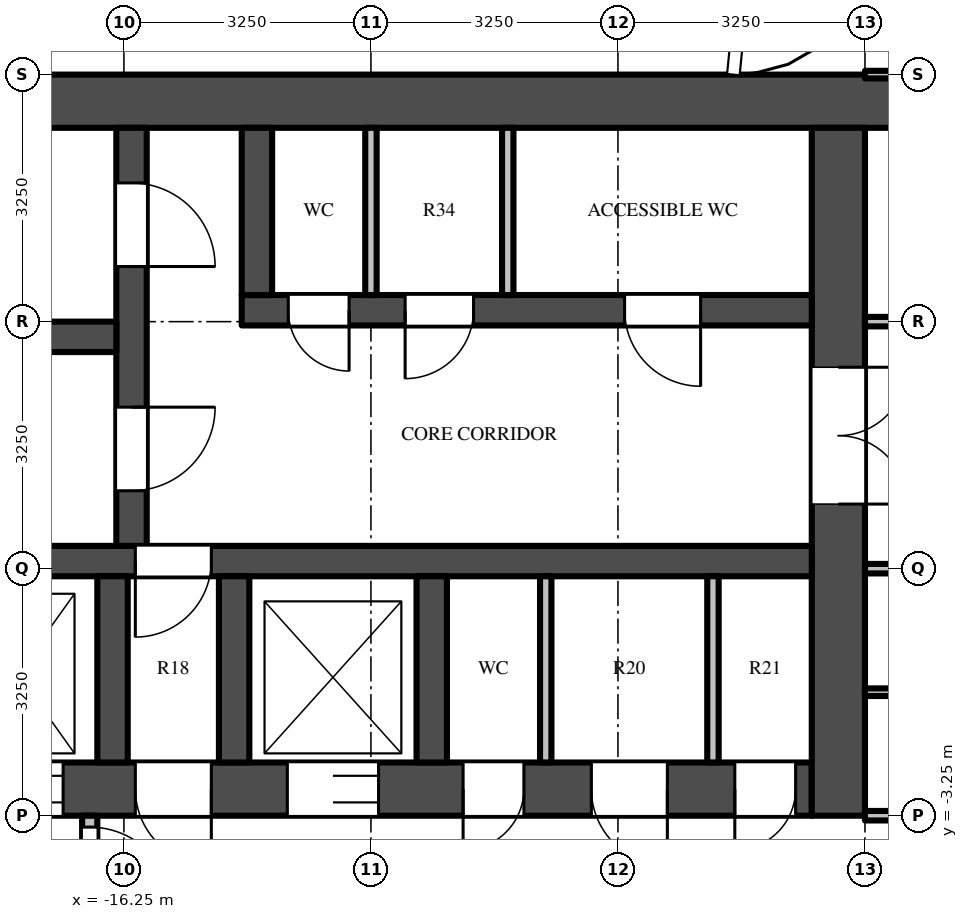
"""IFC4 building model, lengths in metres.
Left out: names, types, materials, properties, quantities, classifications, styles, units other than length and angle.
Written with IfcOpenShell. Run it as: python <this file> out.ifc"""

import sys

from ifc_helpers import new_model, si_unit, direction, frame, frame_2d, origin, place, context, subcontext, project, spatial, rectangle, extrude, source, transform, mapped, element, fill, save


model = new_model("IFC4")
c1 = context("Model", 3, precision=1e-05, world=origin(), true_north=direction((0.0, 1.0)))
c2 = subcontext(c1, "Body", "Model", "MODEL_VIEW")
j1 = project(units=[si_unit("LENGTHUNIT", "METRE"), si_unit("PLANEANGLEUNIT", "RADIAN")], contexts=[c1])
p1 = place(None, origin())
s1 = spatial("IfcSite", under=j1, at=p1, CompositionType="ELEMENT")
p2 = place(p1, origin())
s2 = spatial("IfcBuilding", under=s1, at=p2, CompositionType="ELEMENT")
p3 = place(p2, frame((0.0, 0.0, 295.0)))
s3 = spatial("IfcBuildingStorey", under=s2, at=p3, CompositionType="ELEMENT", Elevation=295.0)
m1 = source(origin(), c2, "Body", "SweptSolid", [
    extrude(rectangle(XDim=16.65, YDim=0.7, at=frame_2d((8.325, 0.0))), origin(), (0.0, 0.0, 1.0), 3.7),
])
p4 = place(p3, frame((-6.1, 6.15, 0.0), z_axis=(0.0, 0.0, 1.0), x_axis=(-1.0, 0.0, 0.0)))
e1 = element("IfcWall", 1, at=p4, inside=s3, PredefinedType="SHEAR", context=c2, shape_type="MappedRepresentation", body=[
    mapped(m1, transform((0.0, 0.0, 0.0))),
])
m2 = source(origin(), c2, "Body", "SweptSolid", [
    extrude(rectangle(XDim=14.85, YDim=0.7, at=frame_2d((7.425, 0.0))), origin(), (0.0, 0.0, 1.0), 3.7),
])
p5 = place(p3, frame((-7.2, -2.9, 0.0), z_axis=(0.0, 0.0, 1.0), x_axis=(-1.0, 0.0, 0.0)))
e2 = element("IfcWall", 2, at=p5, inside=s3, PredefinedType="SHEAR", context=c2, shape_type="MappedRepresentation", body=[
    mapped(m2, transform((0.0, 0.0, 0.0))),
])
m3 = source(origin(), c2, "Body", "SweptSolid", [
    extrude(rectangle(XDim=1.2, YDim=2.1, at=frame_2d((0.6, 1.05))), frame((0.0, 0.36, 0.0), z_axis=(0.0, -1.0, 0.0), x_axis=(1.0, 0.0, 0.0)), (0.0, 0.0, 1.0), 0.72),
])
p6 = place(p5, frame((5.7, 0.0, 0.0)))
e3 = element("IfcOpeningElement", 3, at=p6, cuts=e2, PredefinedType="OPENING", context=c2, shape_type="MappedRepresentation", body=[
    mapped(m3, transform((0.0, 0.0, 0.0))),
])
m4 = source(origin(), c2, "Body", "SweptSolid", [
    extrude(rectangle(XDim=1.3, YDim=2.1, at=frame_2d((0.65, 1.05))), frame((0.0, 0.36, 0.0), z_axis=(0.0, -1.0, 0.0), x_axis=(1.0, 0.0, 0.0)), (0.0, 0.0, 1.0), 0.72),
])
p7 = place(p5, frame((12.2, 0.0, 0.0)))
e4 = element("IfcOpeningElement", 4, at=p7, cuts=e2, PredefinedType="OPENING", context=c2, shape_type="MappedRepresentation", body=[
    mapped(m4, transform((0.0, 0.0, 0.0))),
])
p8 = place(p5, frame((9.85, 0.0, 0.0)))
e5 = element("IfcOpeningElement", 5, at=p8, cuts=e2, PredefinedType="OPENING", context=c2, shape_type="MappedRepresentation", body=[
    mapped(m3, transform((0.0, 0.0, 0.0))),
])
m5 = source(origin(), c2, "Body", "SweptSolid", [
    extrude(rectangle(XDim=1.0, YDim=2.1, at=frame_2d((0.5, 1.05))), frame((0.0, 0.36, 0.0), z_axis=(0.0, -1.0, 0.0), x_axis=(1.0, 0.0, 0.0)), (0.0, 0.0, 1.0), 0.72),
])
p9 = place(p5, frame((7.9, 0.0, 0.0)))
e6 = element("IfcOpeningElement", 6, at=p9, cuts=e2, PredefinedType="OPENING", context=c2, shape_type="MappedRepresentation", body=[
    mapped(m5, transform((0.0, 0.0, 0.0))),
])
m6 = source(origin(), c2, "Body", "SweptSolid", [
    extrude(rectangle(XDim=0.8, YDim=2.1, at=frame_2d((0.4, 1.05))), frame((0.0, 0.36, 0.0), z_axis=(0.0, -1.0, 0.0), x_axis=(1.0, 0.0, 0.0)), (0.0, 0.0, 1.0), 0.72),
])
p10 = place(p5, frame((0.212, 0.0, 0.0)))
e7 = element("IfcOpeningElement", 7, at=p10, cuts=e2, PredefinedType="OPENING", context=c2, shape_type="MappedRepresentation", body=[
    mapped(m6, transform((0.0, 0.0, 0.0))),
])
p11 = place(p5, frame((1.9, 0.0, 0.0)))
e8 = element("IfcOpeningElement", 8, at=p11, cuts=e2, PredefinedType="OPENING", context=c2, shape_type="MappedRepresentation", body=[
    mapped(m5, transform((0.0, 0.0, 0.0))),
])
p12 = place(p5, frame((3.788, 0.0, 0.0)))
e9 = element("IfcOpeningElement", 9, at=p12, cuts=e2, PredefinedType="OPENING", context=c2, shape_type="MappedRepresentation", body=[
    mapped(m6, transform((0.0, 0.0, 0.0))),
])
m7 = source(origin(), c2, "Body", "SweptSolid", [
    extrude(rectangle(XDim=9.05, YDim=0.7, at=frame_2d((4.525, 0.0))), origin(), (0.0, 0.0, 1.0), 3.7),
])
p13 = place(p3, frame((-6.85, 5.8, 0.0), z_axis=(0.0, 0.0, 1.0), x_axis=(0.0, -1.0, 0.0)))
e10 = element("IfcWall", 10, at=p13, inside=s3, PredefinedType="SHEAR", context=c2, shape_type="MappedRepresentation", body=[
    mapped(m7, transform((0.0, 0.0, 0.0))),
])
m8 = source(origin(), c2, "Body", "SweptSolid", [
    extrude(rectangle(XDim=1.8, YDim=2.1, at=frame_2d((0.9, 1.05))), frame((0.0, 0.36, 0.0), z_axis=(0.0, -1.0, 0.0), x_axis=(1.0, 0.0, 0.0)), (0.0, 0.0, 1.0), 0.72),
])
p14 = place(p13, frame((3.15, 0.0, 0.0)))
e11 = element("IfcOpeningElement", 11, at=p14, cuts=e10, PredefinedType="OPENING", context=c2, shape_type="MappedRepresentation", body=[
    mapped(m8, transform((0.0, 0.0, 0.0))),
])
m9 = source(origin(), c2, "Body", "SweptSolid", [
    extrude(rectangle(XDim=7.5, YDim=0.4, at=frame_2d((3.75, 0.0))), origin(), (0.0, 0.0, 1.0), 3.7),
])
p15 = place(p3, frame((-7.2, 3.4, 0.0), z_axis=(0.0, 0.0, 1.0), x_axis=(-1.0, 0.0, 0.0)))
e12 = element("IfcWall", 12, at=p15, inside=s3, PredefinedType="SHEAR", context=c2, shape_type="MappedRepresentation", body=[
    mapped(m9, transform((0.0, 0.0, 0.0))),
])
m10 = source(origin(), c2, "Body", "SweptSolid", [
    extrude(rectangle(XDim=1.0, YDim=2.1, at=frame_2d((0.5, 1.05))), frame((0.0, 0.21, 0.0), z_axis=(0.0, -1.0, 0.0), x_axis=(1.0, 0.0, 0.0)), (0.0, 0.0, 1.0), 0.42),
])
p16 = place(p15, frame((1.462, 0.0, 0.0)))
e13 = element("IfcOpeningElement", 13, at=p16, cuts=e12, PredefinedType="OPENING", context=c2, shape_type="MappedRepresentation", body=[
    mapped(m10, transform((0.0, 0.0, 0.0))),
])
m11 = source(origin(), c2, "Body", "SweptSolid", [
    extrude(rectangle(XDim=0.9, YDim=2.1, at=frame_2d((0.45, 1.05))), frame((0.0, 0.21, 0.0), z_axis=(0.0, -1.0, 0.0), x_axis=(1.0, 0.0, 0.0)), (0.0, 0.0, 1.0), 0.42),
])
p17 = place(p15, frame((4.45, 0.0, 0.0)))
e14 = element("IfcOpeningElement", 14, at=p17, cuts=e12, PredefinedType="OPENING", context=c2, shape_type="MappedRepresentation", body=[
    mapped(m11, transform((0.0, 0.0, 0.0))),
])
m12 = source(origin(), c2, "Body", "SweptSolid", [
    extrude(rectangle(XDim=0.8, YDim=2.1, at=frame_2d((0.4, 1.05))), frame((0.0, 0.21, 0.0), z_axis=(0.0, -1.0, 0.0), x_axis=(1.0, 0.0, 0.0)), (0.0, 0.0, 1.0), 0.42),
])
p18 = place(p15, frame((6.087, 0.0, 0.0)))
e15 = element("IfcOpeningElement", 15, at=p18, cuts=e12, PredefinedType="OPENING", context=c2, shape_type="MappedRepresentation", body=[
    mapped(m12, transform((0.0, 0.0, 0.0))),
])
m13 = source(origin(), c2, "Body", "SweptSolid", [
    extrude(rectangle(XDim=14.85, YDim=0.4, at=frame_2d((7.425, 0.0))), origin(), (0.0, 0.0, 1.0), 3.7),
])
p19 = place(p3, frame((-7.2, 0.1, 0.0), z_axis=(0.0, 0.0, 1.0), x_axis=(-1.0, 0.0, 0.0)))
e16 = element("IfcWall", 16, at=p19, inside=s3, PredefinedType="SHEAR", context=c2, shape_type="MappedRepresentation", body=[
    mapped(m13, transform((0.0, 0.0, 0.0))),
])
p20 = place(p19, frame((7.9, 0.0, 0.0)))
e17 = element("IfcOpeningElement", 17, at=p20, cuts=e16, PredefinedType="OPENING", context=c2, shape_type="MappedRepresentation", body=[
    mapped(m10, transform((0.0, 0.0, 0.0))),
])
m14 = source(origin(), c2, "Body", "SweptSolid", [
    extrude(rectangle(XDim=5.5, YDim=0.4, at=frame_2d((2.75, 0.0))), origin(), (0.0, 0.0, 1.0), 3.7),
])
p21 = place(p3, frame((-16.15, 5.8, 0.0), z_axis=(0.0, 0.0, 1.0), x_axis=(0.0, -1.0, 0.0)))
e18 = element("IfcWall", 18, at=p21, inside=s3, PredefinedType="SHEAR", context=c2, shape_type="MappedRepresentation", body=[
    mapped(m14, transform((0.0, 0.0, 0.0))),
])
m15 = source(origin(), c2, "Body", "SweptSolid", [
    extrude(rectangle(XDim=1.1, YDim=2.1, at=frame_2d((0.55, 1.05))), frame((0.0, 0.21, 0.0), z_axis=(0.0, -1.0, 0.0), x_axis=(1.0, 0.0, 0.0)), (0.0, 0.0, 1.0), 0.42),
])
p22 = place(p21, frame((0.725, 0.0, 0.0)))
e19 = element("IfcOpeningElement", 19, at=p22, cuts=e18, PredefinedType="OPENING", context=c2, shape_type="MappedRepresentation", body=[
    mapped(m15, transform((0.0, 0.0, 0.0))),
])
p23 = place(p21, frame((3.675, 0.0, 0.0)))
e20 = element("IfcOpeningElement", 20, at=p23, cuts=e18, PredefinedType="OPENING", context=c2, shape_type="MappedRepresentation", body=[
    mapped(m15, transform((0.0, 0.0, 0.0))),
])
m16 = source(origin(), c2, "Body", "SweptSolid", [
    extrude(rectangle(XDim=5.7, YDim=0.4, at=frame_2d((2.85, 0.0))), origin(), (0.0, 0.0, 1.0), 3.7),
])
p24 = place(p3, frame((-16.35, 3.05, 0.0), z_axis=(0.0, 0.0, 1.0), x_axis=(-1.0, 0.0, 0.0)))
e21 = element("IfcWall", 21, at=p24, inside=s3, PredefinedType="SHEAR", context=c2, shape_type="MappedRepresentation", body=[
    mapped(m16, transform((0.0, 0.0, 0.0))),
])
m17 = source(origin(), c2, "Body", "SweptSolid", [
    extrude(rectangle(XDim=2.2, YDim=0.4, at=frame_2d((1.1, 0.0))), origin(), (0.0, 0.0, 1.0), 3.7),
])
p25 = place(p3, frame((-14.5, 5.8, 0.0), z_axis=(0.0, 0.0, 1.0), x_axis=(0.0, -1.0, 0.0)))
e22 = element("IfcWall", 22, at=p25, inside=s3, PredefinedType="SHEAR", context=c2, shape_type="MappedRepresentation", body=[
    mapped(m17, transform((0.0, 0.0, 0.0))),
])
m18 = source(origin(), c2, "Body", "SweptSolid", [
    extrude(rectangle(XDim=2.45, YDim=0.4, at=frame_2d((1.225, 0.0))), origin(), (0.0, 0.0, 1.0), 3.7),
])
for number, where, z_axis, x_axis in (
    (23, (-12.2, -0.1, 0.0), (0.0, 0.0, 1.0), (0.0, -1.0, 0.0)),
    (24, (-14.8, -0.1, 0.0), (0.0, 0.0, 1.0), (0.0, -1.0, 0.0)),
    (25, (-16.4, -0.1, 0.0), (0.0, 0.0, 1.0), (0.0, -1.0, 0.0)),
):
    element("IfcWall", number, at=place(p3, frame(where, z_axis=z_axis, x_axis=x_axis)), inside=s3, PredefinedType="SHEAR", context=c2, shape_type="MappedRepresentation", body=[
        mapped(m18, transform((0.0, 0.0, 0.0))),
    ])
m19 = source(origin(), c2, "Body", "SweptSolid", [
    extrude(rectangle(XDim=3.25, YDim=0.2, at=frame_2d((1.625, 0.0))), origin(), (0.0, 0.0, 1.0), 3.7),
])
p26 = place(p3, frame((-16.7, -3.25, 0.0), z_axis=(0.0, 0.0, 1.0), x_axis=(0.0, -1.0, 0.0)))
e26 = element("IfcWall", 26, at=p26, inside=s3, PredefinedType="PARTITIONING", context=c2, shape_type="MappedRepresentation", body=[
    mapped(m19, transform((0.0, 0.0, 0.0))),
])
m20 = source(origin(), c2, "Body", "SweptSolid", [
    extrude(rectangle(XDim=1.1, YDim=2.1, at=frame_2d((0.55, 1.05))), frame((0.0, 0.11, 0.0), z_axis=(0.0, -1.0, 0.0), x_axis=(1.0, 0.0, 0.0)), (0.0, 0.0, 1.0), 0.22),
])
p27 = place(p26, frame((0.15, 0.0, 0.0)))
e27 = element("IfcOpeningElement", 27, at=p27, cuts=e26, PredefinedType="OPENING", context=c2, shape_type="MappedRepresentation", body=[
    mapped(m20, transform((0.0, 0.0, 0.0))),
])
m21 = source(origin(), c2, "Body", "SweptSolid", [
    extrude(rectangle(XDim=2.2, YDim=0.15, at=frame_2d((1.1, 0.0))), origin(), (0.0, 0.0, 1.0), 3.7),
])
for number, where, z_axis, x_axis in (
    (28, (-11.2, 5.8, 0.0), (0.0, 0.0, 1.0), (0.0, -1.0, 0.0)),
    (29, (-13.0, 5.8, 0.0), (0.0, 0.0, 1.0), (0.0, -1.0, 0.0)),
):
    element("IfcWall", number, at=place(p3, frame(where, z_axis=z_axis, x_axis=x_axis)), inside=s3, PredefinedType="PARTITIONING", context=c2, shape_type="MappedRepresentation", body=[
        mapped(m21, transform((0.0, 0.0, 0.0))),
    ])
m22 = source(origin(), c2, "Body", "SweptSolid", [
    extrude(rectangle(XDim=2.45, YDim=0.15, at=frame_2d((1.225, 0.0))), origin(), (0.0, 0.0, 1.0), 3.7),
])
for number, where, z_axis, x_axis in (
    (30, (-8.5, -0.1, 0.0), (0.0, 0.0, 1.0), (0.0, -1.0, 0.0)),
    (31, (-10.7, -0.1, 0.0), (0.0, 0.0, 1.0), (0.0, -1.0, 0.0)),
):
    element("IfcWall", number, at=place(p3, frame(where, z_axis=z_axis, x_axis=x_axis)), inside=s3, PredefinedType="PARTITIONING", context=c2, shape_type="MappedRepresentation", body=[
        mapped(m22, transform((0.0, 0.0, 0.0))),
    ])
m23 = source(origin(), c2, "Body", "SweptSolid", [
    extrude(rectangle(XDim=5.363, YDim=0.125, at=frame_2d((2.681, 0.0))), origin(), (0.0, 0.0, 1.0), 2.997),
])
p28 = place(p3, frame((-1.137, -3.25, 0.0), z_axis=(0.0, 0.0, 1.0), x_axis=(-1.0, 0.0, 0.0)))
e32 = element("IfcWall", 32, at=p28, inside=s3, PredefinedType="PARTITIONING", context=c2, shape_type="MappedRepresentation", body=[
    mapped(m23, transform((0.0, 0.0, 0.0))),
])
m24 = source(origin(), c2, "Body", "SweptSolid", [
    extrude(rectangle(XDim=1.0, YDim=2.1, at=frame_2d((0.5, 1.05))), frame((0.0, 0.073, 0.0), z_axis=(0.0, -1.0, 0.0), x_axis=(1.0, 0.0, 0.0)), (0.0, 0.0, 1.0), 0.145),
])
p29 = place(p28, frame((4.012, 0.0, 0.0)))
e33 = element("IfcOpeningElement", 33, at=p29, cuts=e32, PredefinedType="OPENING", context=c2, shape_type="MappedRepresentation", body=[
    mapped(m24, transform((0.0, 0.0, 0.0))),
])
m25 = source(origin(), c2, "Body", "SweptSolid", [
    extrude(rectangle(XDim=5.238, YDim=0.1, at=frame_2d((2.619, 0.0))), origin(), (0.0, 0.0, 1.0), 2.997),
])
p30 = place(p3, frame((-6.5, -1.625, 0.0), z_axis=(0.0, 0.0, 1.0), x_axis=(1.0, 0.0, 0.0)))
e34 = element("IfcWall", 34, at=p30, inside=s3, PredefinedType="PARTITIONING", context=c2, shape_type="MappedRepresentation", body=[
    mapped(m25, transform((0.0, 0.0, 0.0))),
])
p31 = place(p3, frame((-1.137, 0.0, 0.0), z_axis=(0.0, 0.0, 1.0), x_axis=(-1.0, 0.0, 0.0)))
e35 = element("IfcWall", 35, at=p31, inside=s3, PredefinedType="PARTITIONING", context=c2, shape_type="MappedRepresentation", body=[
    mapped(m23, transform((0.0, 0.0, 0.0))),
])
p32 = place(p31, frame((4.012, 0.0, 0.0)))
e36 = element("IfcOpeningElement", 36, at=p32, cuts=e35, PredefinedType="OPENING", context=c2, shape_type="MappedRepresentation", body=[
    mapped(m24, transform((0.0, 0.0, 0.0))),
])
p33 = place(p3, frame((-6.5, 3.25, 0.0), z_axis=(0.0, 0.0, 1.0), x_axis=(1.0, 0.0, 0.0)))
e37 = element("IfcWall", 37, at=p33, inside=s3, PredefinedType="PARTITIONING", context=c2, shape_type="MappedRepresentation", body=[
    mapped(m23, transform((0.0, 0.0, 0.0))),
])
p34 = place(p33, frame((1.3, 0.0, 0.0)))
e38 = element("IfcOpeningElement", 38, at=p34, cuts=e37, PredefinedType="OPENING", context=c2, shape_type="MappedRepresentation", body=[
    mapped(m24, transform((0.0, 0.0, 0.0))),
])
m26 = source(origin(), c2, "Body", "SweptSolid", [
    extrude(rectangle(XDim=5.238, YDim=0.1, at=frame_2d((2.619, 0.0))), origin(), (0.0, 0.0, 1.0), 2.78),
])
p35 = place(p3, frame((-6.5, 6.5, 0.0), z_axis=(0.0, 0.0, 1.0), x_axis=(1.0, 0.0, 0.0)))
e39 = element("IfcWall", 39, at=p35, inside=s3, PredefinedType="PARTITIONING", context=c2, shape_type="MappedRepresentation", body=[
    mapped(m26, transform((0.0, 0.0, 0.0))),
])
m27 = source(origin(), c2, "Body", "SweptSolid", [
    extrude(rectangle(XDim=1.2, YDim=2.1, at=frame_2d((0.6, 1.05))), frame((0.0, -0.275, 0.0), z_axis=(0.0, -1.0, 0.0), x_axis=(1.0, 0.0, 0.0)), (0.0, 0.0, 1.0), 0.05),
])
p36 = place(p6, origin())
e40 = element("IfcDoor", 40, at=p36, inside=s3, OperationType="DOUBLE_DOOR_SLIDING", PredefinedType="DOOR", context=c2, shape_type="MappedRepresentation", body=[
    mapped(m27, transform((0.0, 0.0, 0.0))),
])
fill(e3, e40)
p37 = place(p8, origin())
e41 = element("IfcDoor", 41, at=p37, inside=s3, OperationType="DOUBLE_DOOR_SLIDING", PredefinedType="DOOR", context=c2, shape_type="MappedRepresentation", body=[
    mapped(m27, transform((0.0, 0.0, 0.0))),
])
fill(e5, e41)
m28 = source(origin(), c2, "Body", "SweptSolid", [
    extrude(rectangle(XDim=1.8, YDim=2.1, at=frame_2d((0.9, 1.05))), frame((0.0, -0.275, 0.0), z_axis=(0.0, -1.0, 0.0), x_axis=(1.0, 0.0, 0.0)), (0.0, 0.0, 1.0), 0.05),
])
p38 = place(p14, origin())
e42 = element("IfcDoor", 42, at=p38, inside=s3, OperationType="DOUBLE_DOOR_SINGLE_SWING", PredefinedType="DOOR", context=c2, shape_type="MappedRepresentation", body=[
    mapped(m28, transform((0.0, 0.0, 0.0))),
])
fill(e11, e42)
m29 = source(origin(), c2, "Body", "SweptSolid", [
    extrude(rectangle(XDim=1.1, YDim=2.1, at=frame_2d((0.55, 1.05))), frame((0.0, 0.025, 0.0), z_axis=(0.0, -1.0, 0.0), x_axis=(1.0, 0.0, 0.0)), (0.0, 0.0, 1.0), 0.05),
])
p39 = place(p22, origin())
e43 = element("IfcDoor", 43, at=p39, inside=s3, OperationType="SINGLE_SWING_RIGHT", PredefinedType="DOOR", context=c2, shape_type="MappedRepresentation", body=[
    mapped(m29, transform((0.0, 0.0, 0.0))),
])
fill(e19, e43)
p40 = place(p23, origin())
e44 = element("IfcDoor", 44, at=p40, inside=s3, OperationType="SINGLE_SWING_LEFT", PredefinedType="DOOR", context=c2, shape_type="MappedRepresentation", body=[
    mapped(m29, transform((0.0, 0.0, 0.0))),
])
fill(e20, e44)
m30 = source(origin(), c2, "Body", "SweptSolid", [
    extrude(rectangle(XDim=1.0, YDim=2.1, at=frame_2d((0.5, 1.05))), frame((0.0, 0.025, 0.0), z_axis=(0.0, -1.0, 0.0), x_axis=(1.0, 0.0, 0.0)), (0.0, 0.0, 1.0), 0.05),
])
p41 = place(p20, origin())
e45 = element("IfcDoor", 45, at=p41, inside=s3, OperationType="SINGLE_SWING_RIGHT", PredefinedType="DOOR", context=c2, shape_type="MappedRepresentation", body=[
    mapped(m30, transform((0.0, 0.0, 0.0))),
])
fill(e17, e45)
m31 = source(origin(), c2, "Body", "SweptSolid", [
    extrude(rectangle(XDim=1.0, YDim=2.1, at=frame_2d((0.5, 1.05))), frame((0.0, -0.275, 0.0), z_axis=(0.0, -1.0, 0.0), x_axis=(1.0, 0.0, 0.0)), (0.0, 0.0, 1.0), 0.05),
])
p42 = place(p9, origin())
e46 = element("IfcDoor", 46, at=p42, inside=s3, OperationType="SINGLE_SWING_LEFT", PredefinedType="DOOR", context=c2, shape_type="MappedRepresentation", body=[
    mapped(m31, transform((0.0, 0.0, 0.0))),
])
fill(e6, e46)
p43 = place(p27, origin())
e47 = element("IfcDoor", 47, at=p43, inside=s3, OperationType="SINGLE_SWING_RIGHT", PredefinedType="DOOR", context=c2, shape_type="MappedRepresentation", body=[
    mapped(m29, transform((0.0, 0.0, 0.0))),
])
fill(e27, e47)
p44 = place(p16, origin())
e48 = element("IfcDoor", 48, at=p44, inside=s3, OperationType="SINGLE_SWING_LEFT", PredefinedType="DOOR", context=c2, shape_type="MappedRepresentation", body=[
    mapped(m30, transform((0.0, 0.0, 0.0))),
])
fill(e13, e48)
m32 = source(origin(), c2, "Body", "SweptSolid", [
    extrude(rectangle(XDim=0.9, YDim=2.1, at=frame_2d((0.45, 1.05))), frame((0.0, 0.025, 0.0), z_axis=(0.0, -1.0, 0.0), x_axis=(1.0, 0.0, 0.0)), (0.0, 0.0, 1.0), 0.05),
])
p45 = place(p17, origin())
e49 = element("IfcDoor", 49, at=p45, inside=s3, OperationType="SINGLE_SWING_RIGHT", PredefinedType="DOOR", context=c2, shape_type="MappedRepresentation", body=[
    mapped(m32, transform((0.0, 0.0, 0.0))),
])
fill(e14, e49)
m33 = source(origin(), c2, "Body", "SweptSolid", [
    extrude(rectangle(XDim=0.8, YDim=2.1, at=frame_2d((0.4, 1.05))), frame((0.0, 0.025, 0.0), z_axis=(0.0, -1.0, 0.0), x_axis=(1.0, 0.0, 0.0)), (0.0, 0.0, 1.0), 0.05),
])
p46 = place(p18, origin())
e50 = element("IfcDoor", 50, at=p46, inside=s3, OperationType="SINGLE_SWING_LEFT", PredefinedType="DOOR", context=c2, shape_type="MappedRepresentation", body=[
    mapped(m33, transform((0.0, 0.0, 0.0))),
])
fill(e15, e50)
m34 = source(origin(), c2, "Body", "SweptSolid", [
    extrude(rectangle(XDim=0.8, YDim=2.1, at=frame_2d((0.4, 1.05))), frame((0.0, -0.275, 0.0), z_axis=(0.0, -1.0, 0.0), x_axis=(1.0, 0.0, 0.0)), (0.0, 0.0, 1.0), 0.05),
])
p47 = place(p10, origin())
e51 = element("IfcDoor", 51, at=p47, inside=s3, OperationType="SINGLE_SWING_RIGHT", PredefinedType="DOOR", context=c2, shape_type="MappedRepresentation", body=[
    mapped(m34, transform((0.0, 0.0, 0.0))),
])
fill(e7, e51)
p48 = place(p11, origin())
e52 = element("IfcDoor", 52, at=p48, inside=s3, OperationType="SINGLE_SWING_LEFT", PredefinedType="DOOR", context=c2, shape_type="MappedRepresentation", body=[
    mapped(m31, transform((0.0, 0.0, 0.0))),
])
fill(e8, e52)
p49 = place(p12, origin())
e53 = element("IfcDoor", 53, at=p49, inside=s3, OperationType="SINGLE_SWING_RIGHT", PredefinedType="DOOR", context=c2, shape_type="MappedRepresentation", body=[
    mapped(m34, transform((0.0, 0.0, 0.0))),
])
fill(e9, e53)
save(model, sys.argv[1])
